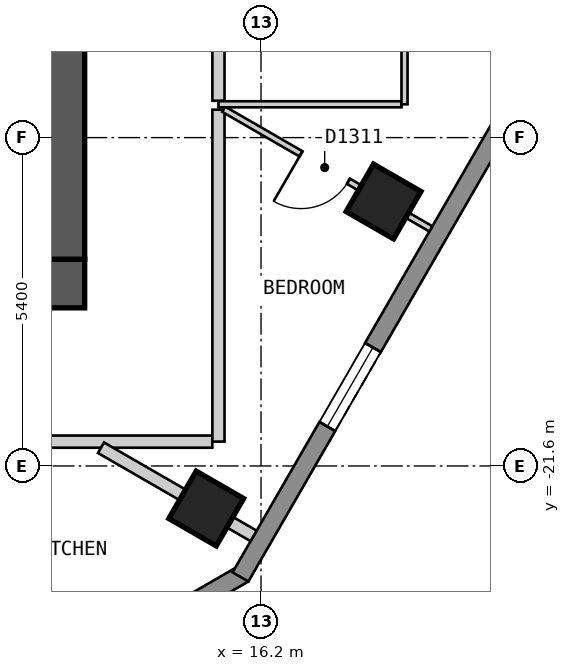
"""IFC4 building model, lengths in metres.
Left out: names, types, materials, properties, quantities, classifications, styles, units other than length and angle.
Written with IfcOpenShell. Run it as: python <this file> out.ifc"""

import sys

from ifc_helpers import new_model, si_unit, direction, frame, frame_2d, origin, origin_2d, place, context, subcontext, project, spatial, polyline, rectangle, outline, extrude, element, fill, save


model = new_model("IFC4")
c1 = context("Model", 3, precision=1e-05, world=origin(), true_north=direction((0.0, 1.0)))
c2 = subcontext(c1, "Body", "Model", "MODEL_VIEW")
j1 = project(units=[si_unit("LENGTHUNIT", "METRE"), si_unit("PLANEANGLEUNIT", "RADIAN")], contexts=[c1])
p1 = place(None, origin())
s1 = spatial("IfcSite", under=j1, at=p1, CompositionType="ELEMENT")
p2 = place(p1, origin())
s2 = spatial("IfcBuilding", under=s1, at=p2, CompositionType="ELEMENT")
p3 = place(p2, frame((0.0, 0.0, 135.6)))
s3 = spatial("IfcBuildingStorey", under=s2, at=p3, CompositionType="ELEMENT", Elevation=135.6)
for number, where, z_axis, x_axis in (
    (1, (15.299, -22.3, 0.0), (0.0, 0.0, 1.0), (0.5, 0.866, 0.0)),
    (2, (18.215, -17.251, 0.0), (0.0, 0.0, 1.0), (0.5, 0.866, 0.0)),
):
    element("IfcColumn", number, at=place(p3, frame(where, z_axis=z_axis, x_axis=x_axis)), inside=s3, PredefinedType="COLUMN", context=c2, shape_type="SweptSolid", body=[
        extrude(rectangle(XDim=0.9, YDim=0.9, at=origin_2d()), origin(), (0.0, 0.0, 1.0), 3.0),
    ])
p4 = place(p3, frame((-13.3, -18.6, 0.0), z_axis=(0.0, 0.0, 1.0), x_axis=(1.0, 0.0, 0.0)))
e3 = element("IfcWall", 3, at=p4, inside=s3, PredefinedType="SHEAR", context=c2, shape_type="SweptSolid", body=[
    extrude(rectangle(XDim=26.6, YDim=0.8, at=frame_2d((13.3, 0.0))), origin(), (0.0, 0.0, 1.0), 2.7),
])
p5 = place(p3, frame((12.9, -18.2, 0.0), z_axis=(0.0, 0.0, 1.0), x_axis=(0.0, 1.0, 0.0)))
e4 = element("IfcWall", 4, at=p5, inside=s3, PredefinedType="SHEAR", context=c2, shape_type="SweptSolid", body=[
    extrude(rectangle(XDim=12.4, YDim=0.8, at=frame_2d((6.2, 0.0))), origin(), (0.0, 0.0, 1.0), 2.7),
])
p6 = place(p3, frame((11.587, -25.87, 0.0), z_axis=(0.0, 0.0, 1.0), x_axis=(0.866022959057, 0.500004234368, 0.0)))
e5 = element("IfcWall", 5, at=p6, inside=s3, PredefinedType="SOLIDWALL", context=c2, shape_type="SweptSolid", body=[
    extrude(outline(polyline([(0.0, -0.15), (5.0, -0.15), (4.92, 0.15), (0.08, 0.15), (0.0, -0.15)])), origin(), (0.0, 0.0, 1.0), 2.7),
])
p7 = place(p6, frame((0.65, 0.0, 0.15)))
e6 = element("IfcOpeningElement", 6, at=p7, cuts=e5, PredefinedType="OPENING", context=c2, shape_type="SweptSolid", body=[
    extrude(rectangle(XDim=1.2, YDim=2.1, at=frame_2d((0.6, 1.05))), frame((0.0, 0.16, 0.0), z_axis=(0.0, -1.0, 0.0), x_axis=(1.0, 0.0, 0.0)), (0.0, 0.0, 1.0), 0.32),
])
p8 = place(p3, frame((15.862, -23.425, 0.0), z_axis=(0.0, 0.0, 1.0), x_axis=(0.500017503135, 0.866015298109, 0.0)))
e7 = element("IfcWall", 7, at=p8, inside=s3, PredefinedType="SOLIDWALL", context=c2, shape_type="SweptSolid", body=[
    extrude(outline(polyline([(0.0, -0.15), (24.711, -0.15), (24.631, 0.15), (0.08, 0.15), (0.0, -0.15)])), origin(), (0.0, 0.0, 1.0), 2.7),
])
p9 = place(p8, frame((2.857, 0.0, 0.15)))
e8 = element("IfcOpeningElement", 8, at=p9, cuts=e7, PredefinedType="OPENING", context=c2, shape_type="SweptSolid", body=[
    extrude(rectangle(XDim=1.5, YDim=2.1, at=frame_2d((0.75, 1.05))), frame((0.0, 0.16, 0.0), z_axis=(0.0, -1.0, 0.0), x_axis=(1.0, 0.0, 0.0)), (0.0, 0.0, 1.0), 0.32),
])
p10 = place(p8, frame((8.689, 0.0, 0.15)))
e9 = element("IfcOpeningElement", 9, at=p10, cuts=e7, PredefinedType="OPENING", context=c2, shape_type="SweptSolid", body=[
    extrude(rectangle(XDim=1.5, YDim=2.1, at=frame_2d((0.75, 1.05))), frame((0.0, 0.16, 0.0), z_axis=(0.0, -1.0, 0.0), x_axis=(1.0, 0.0, 0.0)), (0.0, 0.0, 1.0), 0.32),
])
p11 = place(p8, frame((14.52, 0.0, 0.15)))
e10 = element("IfcOpeningElement", 10, at=p11, cuts=e7, PredefinedType="OPENING", context=c2, shape_type="SweptSolid", body=[
    extrude(rectangle(XDim=1.5, YDim=2.1, at=frame_2d((0.75, 1.05))), frame((0.0, 0.16, 0.0), z_axis=(0.0, -1.0, 0.0), x_axis=(1.0, 0.0, 0.0)), (0.0, 0.0, 1.0), 0.32),
])
p12 = place(p8, frame((20.351, 0.0, 0.15)))
e11 = element("IfcOpeningElement", 11, at=p12, cuts=e7, PredefinedType="OPENING", context=c2, shape_type="SweptSolid", body=[
    extrude(rectangle(XDim=1.5, YDim=2.1, at=frame_2d((0.75, 1.05))), frame((0.0, 0.16, 0.0), z_axis=(0.0, -1.0, 0.0), x_axis=(1.0, 0.0, 0.0)), (0.0, 0.0, 1.0), 0.32),
])
p13 = place(p3, frame((-15.4, -21.2, 0.0), z_axis=(0.0, 0.0, 1.0), x_axis=(1.0, 0.0, 0.0)))
e12 = element("IfcWall", 12, at=p13, inside=s3, PredefinedType="PARTITIONING", context=c2, shape_type="SweptSolid", body=[
    extrude(rectangle(XDim=30.799, YDim=0.2, at=frame_2d((15.399, 0.0))), origin(), (0.0, 0.0, 1.0), 2.7),
])
p14 = place(p13, frame((17.643, 0.0, 0.0)))
e13 = element("IfcOpeningElement", 13, at=p14, cuts=e12, PredefinedType="OPENING", context=c2, shape_type="SweptSolid", body=[
    extrude(rectangle(XDim=1.0, YDim=2.1, at=frame_2d((0.5, 1.05))), frame((0.0, 0.11, 0.0), z_axis=(0.0, -1.0, 0.0), x_axis=(1.0, 0.0, 0.0)), (0.0, 0.0, 1.0), 0.22),
])
p15 = place(p13, frame((2.765, 0.0, 0.0)))
e14 = element("IfcOpeningElement", 14, at=p15, cuts=e12, PredefinedType="OPENING", context=c2, shape_type="SweptSolid", body=[
    extrude(rectangle(XDim=0.8, YDim=2.1, at=frame_2d((0.4, 1.05))), frame((0.0, 0.11, 0.0), z_axis=(0.0, -1.0, 0.0), x_axis=(1.0, 0.0, 0.0)), (0.0, 0.0, 1.0), 0.22),
])
p16 = place(p3, frame((15.5, -21.199, 0.0), z_axis=(0.0, 0.0, 1.0), x_axis=(0.0, 1.0, 0.0)))
e15 = element("IfcWall", 15, at=p16, inside=s3, PredefinedType="PARTITIONING", context=c2, shape_type="SweptSolid", body=[
    extrude(rectangle(XDim=5.458, YDim=0.2, at=frame_2d((2.729, 0.0))), origin(), (0.0, 0.0, 1.0), 2.7),
])
p17 = place(p3, frame((15.5, -15.594, 0.0), z_axis=(0.0, 0.0, 1.0), x_axis=(0.0, 1.0, 0.0)))
e16 = element("IfcWall", 16, at=p17, inside=s3, PredefinedType="PARTITIONING", context=c2, shape_type="SweptSolid", body=[
    extrude(rectangle(XDim=6.542, YDim=0.2, at=frame_2d((3.271, 0.0))), origin(), (0.0, 0.0, 1.0), 2.7),
])
p18 = place(p17, frame((2.742, 0.0, 0.0)))
e17 = element("IfcOpeningElement", 17, at=p18, cuts=e16, PredefinedType="OPENING", context=c2, shape_type="SweptSolid", body=[
    extrude(rectangle(XDim=1.0, YDim=2.1, at=frame_2d((0.5, 1.05))), frame((0.0, 0.11, 0.0), z_axis=(0.0, -1.0, 0.0), x_axis=(1.0, 0.0, 0.0)), (0.0, 0.0, 1.0), 0.22),
])
p19 = place(p3, frame((15.587, -15.734, 0.0), z_axis=(0.0, 0.0, 1.0), x_axis=(0.866023334807, -0.500003583557, 0.0)))
e18 = element("IfcWall", 18, at=p19, inside=s3, PredefinedType="PARTITIONING", context=c2, shape_type="SweptSolid", body=[
    extrude(rectangle(XDim=3.934, YDim=0.1, at=frame_2d((1.967, 0.0))), origin(), (0.0, 0.0, 1.0), 2.7),
])
p20 = place(p19, frame((1.467, 0.0, 0.0)))
e19 = element("IfcOpeningElement", 19, at=p20, cuts=e18, PredefinedType="OPENING", context=c2, shape_type="SweptSolid", body=[
    extrude(rectangle(XDim=0.9, YDim=2.1, at=frame_2d((0.45, 1.05))), frame((0.0, 0.06, 0.0), z_axis=(0.0, -1.0, 0.0), x_axis=(1.0, 0.0, 0.0)), (0.0, 0.0, 1.0), 0.12),
])
p21 = place(p3, frame((15.5, -15.652, 0.0), z_axis=(0.0, 0.0, 1.0), x_axis=(1.0, 0.0, 0.0)))
e20 = element("IfcWall", 20, at=p21, inside=s3, PredefinedType="PARTITIONING", context=c2, shape_type="SweptSolid", body=[
    extrude(rectangle(XDim=3.01, YDim=0.1, at=frame_2d((1.505, 0.0))), origin(), (0.0, 0.0, 1.0), 2.7),
])
p22 = place(p3, frame((18.56, -15.652, 0.0), z_axis=(0.0, 0.0, 1.0), x_axis=(0.0, 1.0, 0.0)))
e21 = element("IfcWall", 21, at=p22, inside=s3, PredefinedType="PARTITIONING", context=c2, shape_type="SweptSolid", body=[
    extrude(rectangle(XDim=4.877, YDim=0.1, at=frame_2d((2.438, 0.0))), origin(), (0.0, 0.0, 1.0), 2.7),
])
p23 = place(p22, frame((2.85, 0.0, 0.0)))
e22 = element("IfcOpeningElement", 22, at=p23, cuts=e21, PredefinedType="OPENING", context=c2, shape_type="SweptSolid", body=[
    extrude(rectangle(XDim=0.9, YDim=2.1, at=frame_2d((0.45, 1.05))), frame((0.0, 0.06, 0.0), z_axis=(0.0, -1.0, 0.0), x_axis=(1.0, 0.0, 0.0)), (0.0, 0.0, 1.0), 0.12),
])
p24 = place(p3, frame((13.568, -21.3, 0.0), z_axis=(0.0, 0.0, 1.0), x_axis=(0.865885342641, -0.500242514586, 0.0)))
e23 = element("IfcWall", 23, at=p24, inside=s3, PredefinedType="PARTITIONING", context=c2, shape_type="SweptSolid", body=[
    extrude(rectangle(XDim=2.898, YDim=0.2, at=frame_2d((1.449, 0.0))), origin(), (0.0, 0.0, 1.0), 2.7),
])
p25 = place(p9, origin())
e24 = element("IfcWindow", 24, at=p25, inside=s3, PartitioningType="SINGLE_PANEL", PredefinedType="WINDOW", context=c2, shape_type="SweptSolid", body=[
    extrude(rectangle(XDim=1.5, YDim=2.1, at=frame_2d((0.75, 1.05))), frame((0.0, 0.03, 0.0), z_axis=(0.0, -1.0, 0.0), x_axis=(1.0, 0.0, 0.0)), (0.0, 0.0, 1.0), 0.06),
])
fill(e8, e24)
p26 = place(p20, origin())
e25 = element("IfcDoor", 25, at=p26, inside=s3, OperationType="SINGLE_SWING_LEFT", PredefinedType="DOOR", context=c2, shape_type="SweptSolid", body=[
    extrude(rectangle(XDim=0.9, YDim=2.1, at=frame_2d((0.45, 1.05))), frame((0.0, 0.025, 0.0), z_axis=(0.0, -1.0, 0.0), x_axis=(1.0, 0.0, 0.0)), (0.0, 0.0, 1.0), 0.05),
])
fill(e19, e25)
save(model, sys.argv[1])
